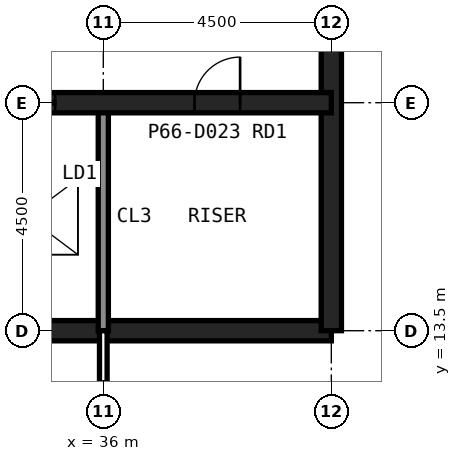
"""IFC4 building model, lengths in metres.
Left out: names, types, materials, properties, quantities, classifications, styles, units other than length and angle.
Written with IfcOpenShell. Run it as: python <this file> out.ifc"""

import sys

from ifc_helpers import new_model, si_unit, direction, frame, frame_2d, origin, place, context, subcontext, project, spatial, rectangle, extrude, element, fill, save


model = new_model("IFC4")
c1 = context("Model", 3, precision=1e-05, world=origin(), true_north=direction((0.0, 1.0)))
c2 = subcontext(c1, "Body", "Model", "MODEL_VIEW")
j1 = project(units=[si_unit("LENGTHUNIT", "METRE"), si_unit("PLANEANGLEUNIT", "RADIAN")], contexts=[c1])
p1 = place(None, origin())
s1 = spatial("IfcSite", under=j1, at=p1, CompositionType="ELEMENT")
p2 = place(p1, origin())
s2 = spatial("IfcBuilding", under=s1, at=p2, CompositionType="ELEMENT")
p3 = place(p2, frame((0.0, 0.0, 278.6)))
s3 = spatial("IfcBuildingStorey", under=s2, at=p3, CompositionType="ELEMENT", Elevation=278.6)
p4 = place(p3, frame((13.5, 13.5, 0.0), z_axis=(0.0, 0.0, 1.0), x_axis=(1.0, 0.0, 0.0)))
e1 = element("IfcWall", 1, at=p4, inside=s3, PredefinedType="SHEAR", context=c2, shape_type="SweptSolid", body=[
    extrude(rectangle(XDim=27.0, YDim=0.4, at=frame_2d((13.5, 0.0))), origin(), (0.0, 0.0, 1.0), 4.0),
])
p5 = place(p3, frame((40.5, 13.5, 0.0), z_axis=(0.0, 0.0, 1.0), x_axis=(0.0, 1.0, 0.0)))
e2 = element("IfcWall", 2, at=p5, inside=s3, PredefinedType="SHEAR", context=c2, shape_type="SweptSolid", body=[
    extrude(rectangle(XDim=27.0, YDim=0.4, at=frame_2d((13.5, 0.0))), origin(), (0.0, 0.0, 1.0), 4.0),
])
p6 = place(p5, frame((5.85, 0.0, 0.0)))
e3 = element("IfcOpeningElement", 3, at=p6, cuts=e2, PredefinedType="OPENING", context=c2, shape_type="SweptSolid", body=[
    extrude(rectangle(XDim=1.8, YDim=2.1, at=frame_2d((0.9, 1.05))), frame((0.0, 0.21, 0.0), z_axis=(0.0, -1.0, 0.0), x_axis=(1.0, 0.0, 0.0)), (0.0, 0.0, 1.0), 0.42),
])
p7 = place(p5, frame((19.65, 0.0, 0.0)))
e4 = element("IfcOpeningElement", 4, at=p7, cuts=e2, PredefinedType="OPENING", context=c2, shape_type="SweptSolid", body=[
    extrude(rectangle(XDim=1.2, YDim=2.1, at=frame_2d((0.6, 1.05))), frame((0.0, 0.21, 0.0), z_axis=(0.0, -1.0, 0.0), x_axis=(1.0, 0.0, 0.0)), (0.0, 0.0, 1.0), 0.42),
])
p8 = place(p3, frame((36.0, 13.5, 0.0), z_axis=(0.0, 0.0, 1.0), x_axis=(0.0, 1.0, 0.0)))
e5 = element("IfcWall", 5, at=p8, inside=s3, PredefinedType="SOLIDWALL", context=c2, shape_type="SweptSolid", body=[
    extrude(rectangle(XDim=4.5, YDim=0.2, at=frame_2d((2.25, 0.0))), origin(), (0.0, 0.0, 1.0), 3.84),
])
p9 = place(p3, frame((13.5, 18.0, 0.0), z_axis=(0.0, 0.0, 1.0), x_axis=(1.0, 0.0, 0.0)))
e6 = element("IfcWall", 6, at=p9, inside=s3, PredefinedType="SHEAR", context=c2, shape_type="SweptSolid", body=[
    extrude(rectangle(XDim=27.0, YDim=0.4, at=frame_2d((13.5, 0.0))), origin(), (0.0, 0.0, 1.0), 4.0),
])
p10 = place(p9, frame((24.3, 0.0, 0.0)))
e7 = element("IfcOpeningElement", 7, at=p10, cuts=e6, PredefinedType="OPENING", context=c2, shape_type="SweptSolid", body=[
    extrude(rectangle(XDim=0.9, YDim=2.1, at=frame_2d((0.45, 1.05))), frame((0.0, 0.21, 0.0), z_axis=(0.0, -1.0, 0.0), x_axis=(1.0, 0.0, 0.0)), (0.0, 0.0, 1.0), 0.42),
])
p11 = place(p9, frame((5.45, 0.0, 0.0)))
e8 = element("IfcOpeningElement", 8, at=p11, cuts=e6, PredefinedType="OPENING", context=c2, shape_type="SweptSolid", body=[
    extrude(rectangle(XDim=1.1, YDim=2.1, at=frame_2d((0.55, 1.05))), frame((0.0, 0.21, 0.0), z_axis=(0.0, -1.0, 0.0), x_axis=(1.0, 0.0, 0.0)), (0.0, 0.0, 1.0), 0.42),
])
p12 = place(p9, frame((8.45, 0.0, 0.0)))
e9 = element("IfcOpeningElement", 9, at=p12, cuts=e6, PredefinedType="OPENING", context=c2, shape_type="SweptSolid", body=[
    extrude(rectangle(XDim=1.1, YDim=2.1, at=frame_2d((0.55, 1.05))), frame((0.0, 0.21, 0.0), z_axis=(0.0, -1.0, 0.0), x_axis=(1.0, 0.0, 0.0)), (0.0, 0.0, 1.0), 0.42),
])
p13 = place(p9, frame((11.45, 0.0, 0.0)))
e10 = element("IfcOpeningElement", 10, at=p13, cuts=e6, PredefinedType="OPENING", context=c2, shape_type="SweptSolid", body=[
    extrude(rectangle(XDim=1.1, YDim=2.1, at=frame_2d((0.55, 1.05))), frame((0.0, 0.21, 0.0), z_axis=(0.0, -1.0, 0.0), x_axis=(1.0, 0.0, 0.0)), (0.0, 0.0, 1.0), 0.42),
])
p14 = place(p9, frame((14.45, 0.0, 0.0)))
e11 = element("IfcOpeningElement", 11, at=p14, cuts=e6, PredefinedType="OPENING", context=c2, shape_type="SweptSolid", body=[
    extrude(rectangle(XDim=1.1, YDim=2.1, at=frame_2d((0.55, 1.05))), frame((0.0, 0.21, 0.0), z_axis=(0.0, -1.0, 0.0), x_axis=(1.0, 0.0, 0.0)), (0.0, 0.0, 1.0), 0.42),
])
p15 = place(p9, frame((17.45, 0.0, 0.0)))
e12 = element("IfcOpeningElement", 12, at=p15, cuts=e6, PredefinedType="OPENING", context=c2, shape_type="SweptSolid", body=[
    extrude(rectangle(XDim=1.1, YDim=2.1, at=frame_2d((0.55, 1.05))), frame((0.0, 0.21, 0.0), z_axis=(0.0, -1.0, 0.0), x_axis=(1.0, 0.0, 0.0)), (0.0, 0.0, 1.0), 0.42),
])
p16 = place(p9, frame((20.45, 0.0, 0.0)))
e13 = element("IfcOpeningElement", 13, at=p16, cuts=e6, PredefinedType="OPENING", context=c2, shape_type="SweptSolid", body=[
    extrude(rectangle(XDim=1.1, YDim=2.1, at=frame_2d((0.55, 1.05))), frame((0.0, 0.21, 0.0), z_axis=(0.0, -1.0, 0.0), x_axis=(1.0, 0.0, 0.0)), (0.0, 0.0, 1.0), 0.42),
])
p17 = place(p9, frame((1.6, 0.0, 0.0)))
e14 = element("IfcOpeningElement", 14, at=p17, cuts=e6, PredefinedType="OPENING", context=c2, shape_type="SweptSolid", body=[
    extrude(rectangle(XDim=1.3, YDim=2.2, at=frame_2d((0.65, 1.1))), frame((0.0, 0.21, 0.0), z_axis=(0.0, -1.0, 0.0), x_axis=(1.0, 0.0, 0.0)), (0.0, 0.0, 1.0), 0.42),
])
p18 = place(p3, frame((36.0, 10.5, 0.0), z_axis=(0.0, 0.0, 1.0), x_axis=(0.0, 1.0, 0.0)))
e15 = element("IfcWall", 15, at=p18, inside=s3, PredefinedType="PARTITIONING", context=c2, shape_type="SweptSolid", body=[
    extrude(rectangle(XDim=3.0, YDim=0.15, at=frame_2d((1.5, 0.0))), origin(), (0.0, 0.0, 1.0), 2.989),
])
p19 = place(p18, frame((1.0, 0.0, 0.0)))
e16 = element("IfcOpeningElement", 16, at=p19, cuts=e15, PredefinedType="OPENING", context=c2, shape_type="SweptSolid", body=[
    extrude(rectangle(XDim=1.0, YDim=2.1, at=frame_2d((0.5, 1.05))), frame((0.0, 0.085, 0.0), z_axis=(0.0, -1.0, 0.0), x_axis=(1.0, 0.0, 0.0)), (0.0, 0.0, 1.0), 0.17),
])
p20 = place(p10, origin())
e17 = element("IfcDoor", 17, at=p20, inside=s3, OperationType="SINGLE_SWING_RIGHT", PredefinedType="DOOR", context=c2, shape_type="SweptSolid", body=[
    extrude(rectangle(XDim=0.9, YDim=2.1, at=frame_2d((0.45, 1.05))), frame((0.0, 0.025, 0.0), z_axis=(0.0, -1.0, 0.0), x_axis=(1.0, 0.0, 0.0)), (0.0, 0.0, 1.0), 0.05),
])
fill(e7, e17)
p21 = place(p16, origin())
e18 = element("IfcDoor", 18, at=p21, inside=s3, OperationType="SLIDING_TO_LEFT", PredefinedType="DOOR", context=c2, shape_type="SweptSolid", body=[
    extrude(rectangle(XDim=1.1, YDim=2.1, at=frame_2d((0.55, 1.05))), frame((0.0, 0.025, 0.0), z_axis=(0.0, -1.0, 0.0), x_axis=(1.0, 0.0, 0.0)), (0.0, 0.0, 1.0), 0.05),
])
fill(e13, e18)
save(model, sys.argv[1])
